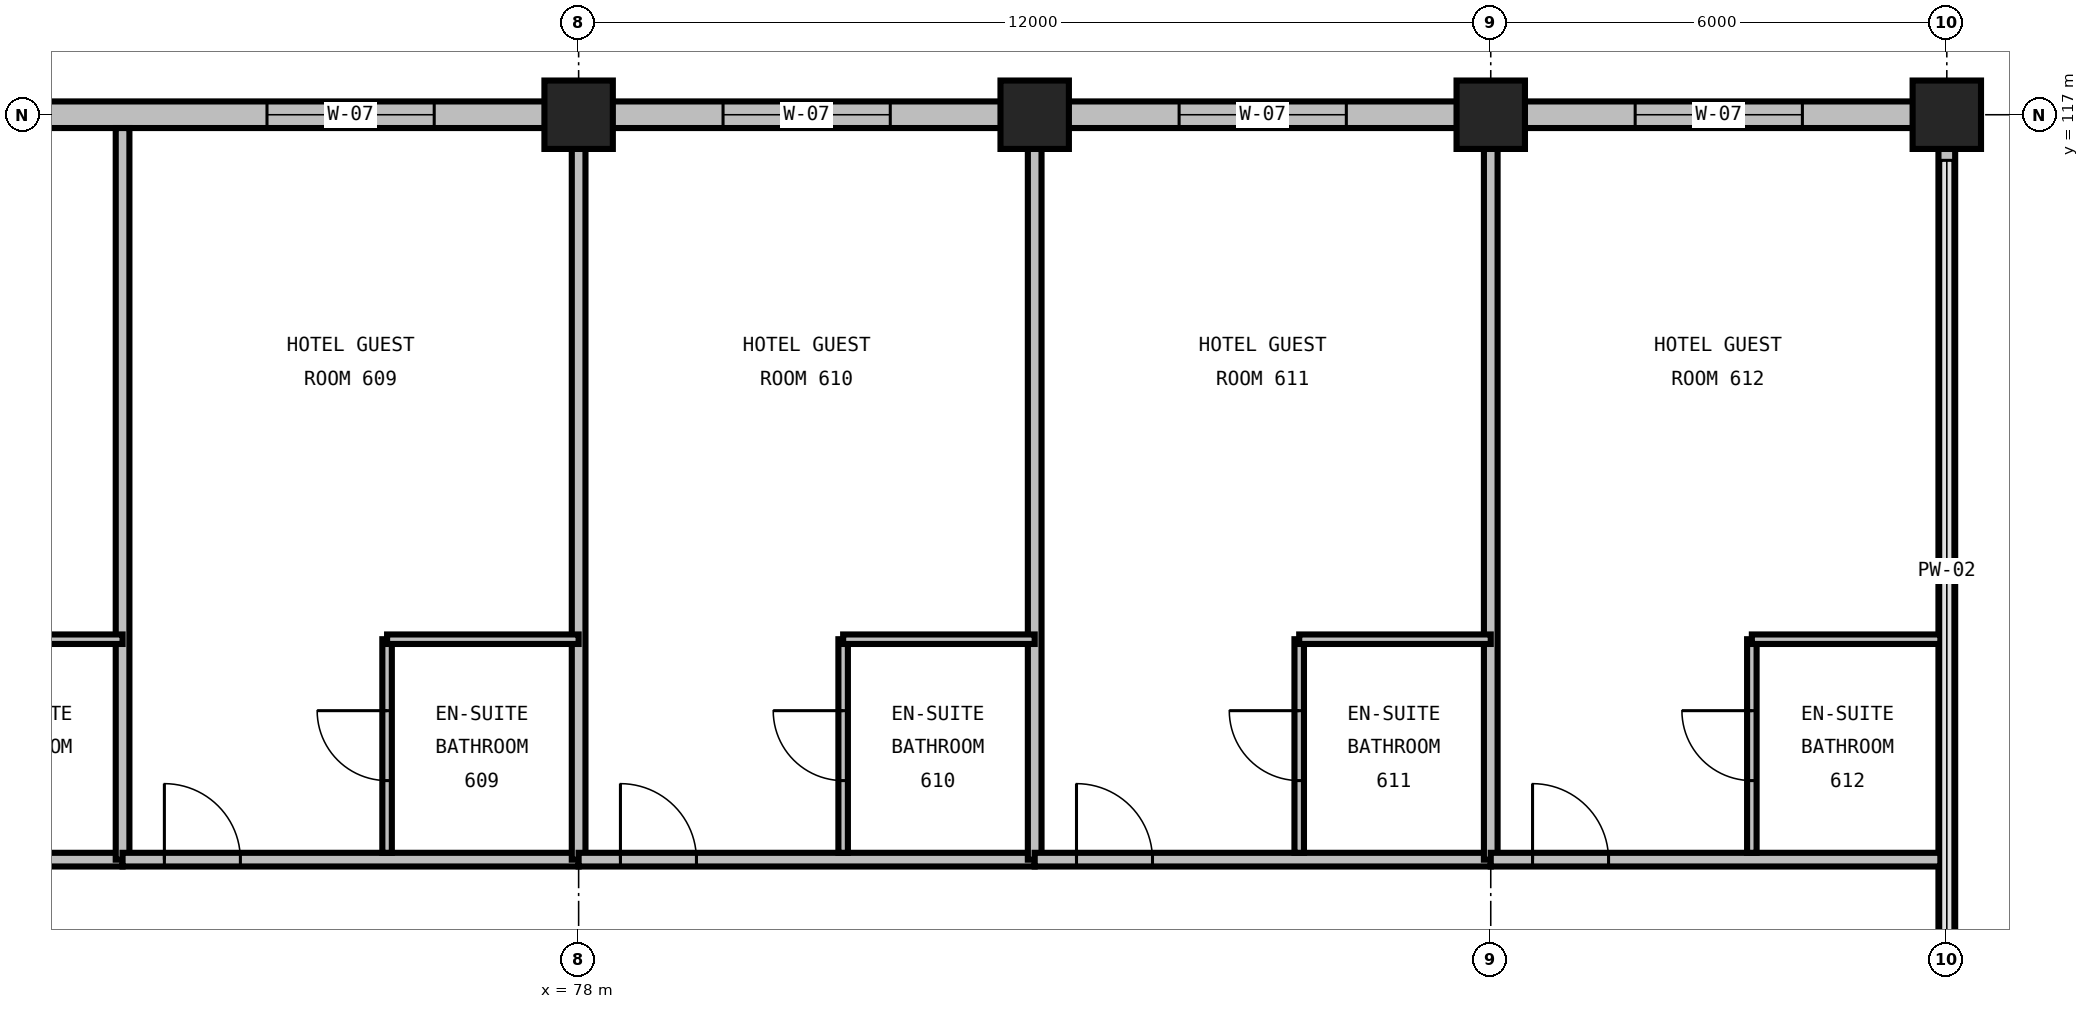
"""IFC4 building model, lengths in metres.
Left out: names, types, materials, properties, quantities, classifications, styles, units other than length and angle.
Written with IfcOpenShell. Run it as: python <this file> out.ifc"""

import sys

from ifc_helpers import new_model, si_unit, direction, frame, frame_2d, origin, origin_2d, place, context, subcontext, project, spatial, rectangle, extrude, element, fill, save


model = new_model("IFC4")
c1 = context("Model", 3, precision=1e-05, world=origin(), true_north=direction((0.0, 1.0)))
c2 = subcontext(c1, "Body", "Model", "MODEL_VIEW")
j1 = project(units=[si_unit("LENGTHUNIT", "METRE"), si_unit("PLANEANGLEUNIT", "RADIAN")], contexts=[c1])
p1 = place(None, origin())
s1 = spatial("IfcSite", under=j1, at=p1, CompositionType="ELEMENT")
p2 = place(p1, origin())
s2 = spatial("IfcBuilding", under=s1, at=p2, CompositionType="ELEMENT")
p3 = place(p2, frame((0.0, 0.0, 31.2)))
s3 = spatial("IfcBuildingStorey", under=s2, at=p3, CompositionType="ELEMENT", Elevation=31.2)
for number, where, z_axis, x_axis in (
    (1, (78.0, 117.0, 0.0), (0.0, 0.0, 1.0), (1.0, 0.0, 0.0)),
    (2, (84.0, 117.0, 0.0), (0.0, 0.0, 1.0), (1.0, 0.0, 0.0)),
    (3, (90.0, 117.0, 0.0), (0.0, 0.0, 1.0), (1.0, 0.0, 0.0)),
    (4, (96.0, 117.0, 0.0), (0.0, 0.0, 1.0), (1.0, 0.0, 0.0)),
):
    element("IfcColumn", number, at=place(p3, frame(where, z_axis=z_axis, x_axis=x_axis)), inside=s3, PredefinedType="COLUMN", context=c2, shape_type="SweptSolid", body=[
        extrude(rectangle(XDim=0.9, YDim=0.9, at=origin_2d()), origin(), (0.0, 0.0, 1.0), 3.6),
    ])
p4 = place(p3, frame((78.0, 117.0, 0.0), z_axis=(0.0, 0.0, 1.0), x_axis=(-1.0, 0.0, 0.0)))
e5 = element("IfcWall", 5, at=p4, inside=s3, PredefinedType="STANDARD", context=c2, shape_type="SweptSolid", body=[
    extrude(rectangle(XDim=12.0, YDim=0.35, at=frame_2d((6.0, 0.0))), origin(), (0.0, 0.0, 1.0), 2.486),
])
p5 = place(p4, frame((1.9, 0.0, 0.75)))
e6 = element("IfcOpeningElement", 6, at=p5, cuts=e5, PredefinedType="OPENING", context=c2, shape_type="SweptSolid", body=[
    extrude(rectangle(XDim=2.2, YDim=1.6, at=frame_2d((1.1, 0.8))), frame((0.0, 0.19, 0.0), z_axis=(0.0, -1.0, 0.0), x_axis=(1.0, 0.0, 0.0)), (0.0, 0.0, 1.0), 0.38),
])
p6 = place(p4, frame((7.825, 0.0, 0.75)))
e7 = element("IfcOpeningElement", 7, at=p6, cuts=e5, PredefinedType="OPENING", context=c2, shape_type="SweptSolid", body=[
    extrude(rectangle(XDim=2.35, YDim=1.6, at=frame_2d((1.175, 0.8))), frame((0.0, 0.19, 0.0), z_axis=(0.0, -1.0, 0.0), x_axis=(1.0, 0.0, 0.0)), (0.0, 0.0, 1.0), 0.38),
])
p7 = place(p3, frame((84.0, 117.0, 0.0), z_axis=(0.0, 0.0, 1.0), x_axis=(-1.0, 0.0, 0.0)))
e8 = element("IfcWall", 8, at=p7, inside=s3, PredefinedType="STANDARD", context=c2, shape_type="SweptSolid", body=[
    extrude(rectangle(XDim=6.0, YDim=0.35, at=frame_2d((3.0, 0.0))), origin(), (0.0, 0.0, 1.0), 2.486),
])
p8 = place(p7, frame((1.9, 0.0, 0.75)))
e9 = element("IfcOpeningElement", 9, at=p8, cuts=e8, PredefinedType="OPENING", context=c2, shape_type="SweptSolid", body=[
    extrude(rectangle(XDim=2.2, YDim=1.6, at=frame_2d((1.1, 0.8))), frame((0.0, 0.19, 0.0), z_axis=(0.0, -1.0, 0.0), x_axis=(1.0, 0.0, 0.0)), (0.0, 0.0, 1.0), 0.38),
])
p9 = place(p3, frame((90.0, 117.0, 0.0), z_axis=(0.0, 0.0, 1.0), x_axis=(-1.0, 0.0, 0.0)))
e10 = element("IfcWall", 10, at=p9, inside=s3, PredefinedType="STANDARD", context=c2, shape_type="SweptSolid", body=[
    extrude(rectangle(XDim=6.0, YDim=0.35, at=frame_2d((3.0, 0.0))), origin(), (0.0, 0.0, 1.0), 2.486),
])
p10 = place(p9, frame((1.9, 0.0, 0.75)))
e11 = element("IfcOpeningElement", 11, at=p10, cuts=e10, PredefinedType="OPENING", context=c2, shape_type="SweptSolid", body=[
    extrude(rectangle(XDim=2.2, YDim=1.6, at=frame_2d((1.1, 0.8))), frame((0.0, 0.19, 0.0), z_axis=(0.0, -1.0, 0.0), x_axis=(1.0, 0.0, 0.0)), (0.0, 0.0, 1.0), 0.38),
])
p11 = place(p3, frame((96.0, 117.0, 0.0), z_axis=(0.0, 0.0, 1.0), x_axis=(-1.0, 0.0, 0.0)))
e12 = element("IfcWall", 12, at=p11, inside=s3, PredefinedType="STANDARD", context=c2, shape_type="SweptSolid", body=[
    extrude(rectangle(XDim=6.0, YDim=0.35, at=frame_2d((3.0, 0.0))), origin(), (0.0, 0.0, 1.0), 2.486),
])
p12 = place(p11, frame((1.9, 0.0, 0.75)))
e13 = element("IfcOpeningElement", 13, at=p12, cuts=e12, PredefinedType="OPENING", context=c2, shape_type="SweptSolid", body=[
    extrude(rectangle(XDim=2.2, YDim=1.6, at=frame_2d((1.1, 0.8))), frame((0.0, 0.19, 0.0), z_axis=(0.0, -1.0, 0.0), x_axis=(1.0, 0.0, 0.0)), (0.0, 0.0, 1.0), 0.38),
])
p13 = place(p3, frame((96.0, 105.0, 0.0), z_axis=(0.0, 0.0, 1.0), x_axis=(0.0, 1.0, 0.0)))
e14 = element("IfcWall", 14, at=p13, inside=s3, PredefinedType="PARAPET", context=c2, shape_type="SweptSolid", body=[
    extrude(rectangle(XDim=12.0, YDim=0.22, at=frame_2d((6.0, 0.0))), origin(), (0.0, 0.0, 1.0), 0.2),
])
p14 = place(p3, frame((66.0, 107.2, 0.0), z_axis=(0.0, 0.0, 1.0), x_axis=(1.0, 0.0, 0.0)))
e15 = element("IfcWall", 15, at=p14, inside=s3, PredefinedType="PARTITIONING", context=c2, shape_type="SweptSolid", body=[
    extrude(rectangle(XDim=6.0, YDim=0.18, at=frame_2d((3.0, 0.0))), origin(), (0.0, 0.0, 1.0), 3.29),
])
p15 = place(p14, frame((0.55, 0.0, 0.0)))
e16 = element("IfcOpeningElement", 16, at=p15, cuts=e15, PredefinedType="OPENING", context=c2, shape_type="SweptSolid", body=[
    extrude(rectangle(XDim=1.0, YDim=2.15, at=frame_2d((0.5, 1.075))), frame((0.0, 0.105, 0.0), z_axis=(0.0, -1.0, 0.0), x_axis=(1.0, 0.0, 0.0)), (0.0, 0.0, 1.0), 0.21),
])
p16 = place(p3, frame((72.0, 107.2, 0.0), z_axis=(0.0, 0.0, 1.0), x_axis=(0.0, 1.0, 0.0)))
e17 = element("IfcWall", 17, at=p16, inside=s3, PredefinedType="PARTITIONING", context=c2, shape_type="SweptSolid", body=[
    extrude(rectangle(XDim=9.625, YDim=0.18, at=frame_2d((4.812, 0.0))), origin(), (0.0, 0.0, 1.0), 3.29),
])
p17 = place(p3, frame((69.48, 110.1, 0.0), z_axis=(0.0, 0.0, 1.0), x_axis=(1.0, 0.0, 0.0)))
e18 = element("IfcWall", 18, at=p17, inside=s3, PredefinedType="PARTITIONING", context=c2, shape_type="SweptSolid", body=[
    extrude(rectangle(XDim=2.52, YDim=0.125, at=frame_2d((1.26, 0.0))), origin(), (0.0, 0.0, 1.0), 3.29),
])
p18 = place(p3, frame((72.0, 107.2, 0.0), z_axis=(0.0, 0.0, 1.0), x_axis=(1.0, 0.0, 0.0)))
e19 = element("IfcWall", 19, at=p18, inside=s3, PredefinedType="PARTITIONING", context=c2, shape_type="SweptSolid", body=[
    extrude(rectangle(XDim=6.0, YDim=0.18, at=frame_2d((3.0, 0.0))), origin(), (0.0, 0.0, 1.0), 3.29),
])
p19 = place(p18, frame((0.55, 0.0, 0.0)))
e20 = element("IfcOpeningElement", 20, at=p19, cuts=e19, PredefinedType="OPENING", context=c2, shape_type="SweptSolid", body=[
    extrude(rectangle(XDim=1.0, YDim=2.15, at=frame_2d((0.5, 1.075))), frame((0.0, 0.105, 0.0), z_axis=(0.0, -1.0, 0.0), x_axis=(1.0, 0.0, 0.0)), (0.0, 0.0, 1.0), 0.21),
])
p20 = place(p3, frame((78.0, 107.2, 0.0), z_axis=(0.0, 0.0, 1.0), x_axis=(0.0, 1.0, 0.0)))
e21 = element("IfcWall", 21, at=p20, inside=s3, PredefinedType="PARTITIONING", context=c2, shape_type="SweptSolid", body=[
    extrude(rectangle(XDim=9.625, YDim=0.18, at=frame_2d((4.812, 0.0))), origin(), (0.0, 0.0, 1.0), 2.59),
])
p21 = place(p3, frame((75.48, 107.29, 0.0), z_axis=(0.0, 0.0, 1.0), x_axis=(0.0, 1.0, 0.0)))
e22 = element("IfcWall", 22, at=p21, inside=s3, PredefinedType="PARTITIONING", context=c2, shape_type="SweptSolid", body=[
    extrude(rectangle(XDim=2.81, YDim=0.125, at=frame_2d((1.405, 0.0))), origin(), (0.0, 0.0, 1.0), 3.29),
])
p22 = place(p21, frame((0.95, 0.0, 0.0)))
e23 = element("IfcOpeningElement", 23, at=p22, cuts=e22, PredefinedType="OPENING", context=c2, shape_type="SweptSolid", body=[
    extrude(rectangle(XDim=0.92, YDim=2.1, at=frame_2d((0.46, 1.05))), frame((0.0, 0.077, 0.0), z_axis=(0.0, -1.0, 0.0), x_axis=(1.0, 0.0, 0.0)), (0.0, 0.0, 1.0), 0.155),
])
p23 = place(p3, frame((75.48, 110.1, 0.0), z_axis=(0.0, 0.0, 1.0), x_axis=(1.0, 0.0, 0.0)))
e24 = element("IfcWall", 24, at=p23, inside=s3, PredefinedType="PARTITIONING", context=c2, shape_type="SweptSolid", body=[
    extrude(rectangle(XDim=2.52, YDim=0.125, at=frame_2d((1.26, 0.0))), origin(), (0.0, 0.0, 1.0), 3.29),
])
p24 = place(p3, frame((78.0, 107.2, 0.0), z_axis=(0.0, 0.0, 1.0), x_axis=(1.0, 0.0, 0.0)))
e25 = element("IfcWall", 25, at=p24, inside=s3, PredefinedType="PARTITIONING", context=c2, shape_type="SweptSolid", body=[
    extrude(rectangle(XDim=6.0, YDim=0.18, at=frame_2d((3.0, 0.0))), origin(), (0.0, 0.0, 1.0), 3.29),
])
p25 = place(p24, frame((0.55, 0.0, 0.0)))
e26 = element("IfcOpeningElement", 26, at=p25, cuts=e25, PredefinedType="OPENING", context=c2, shape_type="SweptSolid", body=[
    extrude(rectangle(XDim=1.0, YDim=2.15, at=frame_2d((0.5, 1.075))), frame((0.0, 0.105, 0.0), z_axis=(0.0, -1.0, 0.0), x_axis=(1.0, 0.0, 0.0)), (0.0, 0.0, 1.0), 0.21),
])
p26 = place(p3, frame((84.0, 107.2, 0.0), z_axis=(0.0, 0.0, 1.0), x_axis=(0.0, 1.0, 0.0)))
e27 = element("IfcWall", 27, at=p26, inside=s3, PredefinedType="PARTITIONING", context=c2, shape_type="SweptSolid", body=[
    extrude(rectangle(XDim=9.625, YDim=0.18, at=frame_2d((4.812, 0.0))), origin(), (0.0, 0.0, 1.0), 2.59),
])
p27 = place(p3, frame((81.48, 107.29, 0.0), z_axis=(0.0, 0.0, 1.0), x_axis=(0.0, 1.0, 0.0)))
e28 = element("IfcWall", 28, at=p27, inside=s3, PredefinedType="PARTITIONING", context=c2, shape_type="SweptSolid", body=[
    extrude(rectangle(XDim=2.81, YDim=0.125, at=frame_2d((1.405, 0.0))), origin(), (0.0, 0.0, 1.0), 3.29),
])
p28 = place(p27, frame((0.95, 0.0, 0.0)))
e29 = element("IfcOpeningElement", 29, at=p28, cuts=e28, PredefinedType="OPENING", context=c2, shape_type="SweptSolid", body=[
    extrude(rectangle(XDim=0.92, YDim=2.1, at=frame_2d((0.46, 1.05))), frame((0.0, 0.077, 0.0), z_axis=(0.0, -1.0, 0.0), x_axis=(1.0, 0.0, 0.0)), (0.0, 0.0, 1.0), 0.155),
])
p29 = place(p3, frame((81.48, 110.1, 0.0), z_axis=(0.0, 0.0, 1.0), x_axis=(1.0, 0.0, 0.0)))
e30 = element("IfcWall", 30, at=p29, inside=s3, PredefinedType="PARTITIONING", context=c2, shape_type="SweptSolid", body=[
    extrude(rectangle(XDim=2.52, YDim=0.125, at=frame_2d((1.26, 0.0))), origin(), (0.0, 0.0, 1.0), 3.29),
])
p30 = place(p3, frame((84.0, 107.2, 0.0), z_axis=(0.0, 0.0, 1.0), x_axis=(1.0, 0.0, 0.0)))
e31 = element("IfcWall", 31, at=p30, inside=s3, PredefinedType="PARTITIONING", context=c2, shape_type="SweptSolid", body=[
    extrude(rectangle(XDim=6.0, YDim=0.18, at=frame_2d((3.0, 0.0))), origin(), (0.0, 0.0, 1.0), 3.29),
])
p31 = place(p30, frame((0.55, 0.0, 0.0)))
e32 = element("IfcOpeningElement", 32, at=p31, cuts=e31, PredefinedType="OPENING", context=c2, shape_type="SweptSolid", body=[
    extrude(rectangle(XDim=1.0, YDim=2.15, at=frame_2d((0.5, 1.075))), frame((0.0, 0.105, 0.0), z_axis=(0.0, -1.0, 0.0), x_axis=(1.0, 0.0, 0.0)), (0.0, 0.0, 1.0), 0.21),
])
p32 = place(p3, frame((90.0, 107.2, 0.0), z_axis=(0.0, 0.0, 1.0), x_axis=(0.0, 1.0, 0.0)))
e33 = element("IfcWall", 33, at=p32, inside=s3, PredefinedType="PARTITIONING", context=c2, shape_type="SweptSolid", body=[
    extrude(rectangle(XDim=9.625, YDim=0.18, at=frame_2d((4.812, 0.0))), origin(), (0.0, 0.0, 1.0), 2.59),
])
p33 = place(p3, frame((87.48, 107.29, 0.0), z_axis=(0.0, 0.0, 1.0), x_axis=(0.0, 1.0, 0.0)))
e34 = element("IfcWall", 34, at=p33, inside=s3, PredefinedType="PARTITIONING", context=c2, shape_type="SweptSolid", body=[
    extrude(rectangle(XDim=2.81, YDim=0.125, at=frame_2d((1.405, 0.0))), origin(), (0.0, 0.0, 1.0), 3.29),
])
p34 = place(p33, frame((0.95, 0.0, 0.0)))
e35 = element("IfcOpeningElement", 35, at=p34, cuts=e34, PredefinedType="OPENING", context=c2, shape_type="SweptSolid", body=[
    extrude(rectangle(XDim=0.92, YDim=2.1, at=frame_2d((0.46, 1.05))), frame((0.0, 0.077, 0.0), z_axis=(0.0, -1.0, 0.0), x_axis=(1.0, 0.0, 0.0)), (0.0, 0.0, 1.0), 0.155),
])
p35 = place(p3, frame((87.48, 110.1, 0.0), z_axis=(0.0, 0.0, 1.0), x_axis=(1.0, 0.0, 0.0)))
e36 = element("IfcWall", 36, at=p35, inside=s3, PredefinedType="PARTITIONING", context=c2, shape_type="SweptSolid", body=[
    extrude(rectangle(XDim=2.52, YDim=0.125, at=frame_2d((1.26, 0.0))), origin(), (0.0, 0.0, 1.0), 3.29),
])
p36 = place(p3, frame((90.0, 107.2, 0.0), z_axis=(0.0, 0.0, 1.0), x_axis=(1.0, 0.0, 0.0)))
e37 = element("IfcWall", 37, at=p36, inside=s3, PredefinedType="PARTITIONING", context=c2, shape_type="SweptSolid", body=[
    extrude(rectangle(XDim=5.915, YDim=0.18, at=frame_2d((2.957, 0.0))), origin(), (0.0, 0.0, 1.0), 3.29),
])
p37 = place(p36, frame((0.55, 0.0, 0.0)))
e38 = element("IfcOpeningElement", 38, at=p37, cuts=e37, PredefinedType="OPENING", context=c2, shape_type="SweptSolid", body=[
    extrude(rectangle(XDim=1.0, YDim=2.15, at=frame_2d((0.5, 1.075))), frame((0.0, 0.105, 0.0), z_axis=(0.0, -1.0, 0.0), x_axis=(1.0, 0.0, 0.0)), (0.0, 0.0, 1.0), 0.21),
])
p38 = place(p3, frame((93.435, 107.29, 0.0), z_axis=(0.0, 0.0, 1.0), x_axis=(0.0, 1.0, 0.0)))
e39 = element("IfcWall", 39, at=p38, inside=s3, PredefinedType="PARTITIONING", context=c2, shape_type="SweptSolid", body=[
    extrude(rectangle(XDim=2.81, YDim=0.125, at=frame_2d((1.405, 0.0))), origin(), (0.0, 0.0, 1.0), 3.29),
])
p39 = place(p38, frame((0.95, 0.0, 0.0)))
e40 = element("IfcOpeningElement", 40, at=p39, cuts=e39, PredefinedType="OPENING", context=c2, shape_type="SweptSolid", body=[
    extrude(rectangle(XDim=0.92, YDim=2.1, at=frame_2d((0.46, 1.05))), frame((0.0, 0.077, 0.0), z_axis=(0.0, -1.0, 0.0), x_axis=(1.0, 0.0, 0.0)), (0.0, 0.0, 1.0), 0.155),
])
p40 = place(p3, frame((93.435, 110.1, 0.0), z_axis=(0.0, 0.0, 1.0), x_axis=(1.0, 0.0, 0.0)))
e41 = element("IfcWall", 41, at=p40, inside=s3, PredefinedType="PARTITIONING", context=c2, shape_type="SweptSolid", body=[
    extrude(rectangle(XDim=2.48, YDim=0.125, at=frame_2d((1.24, 0.0))), origin(), (0.0, 0.0, 1.0), 3.29),
])
p41 = place(p5, origin())
e42 = element("IfcWindow", 42, at=p41, inside=s3, PartitioningType="DOUBLE_PANEL_VERTICAL", PredefinedType="WINDOW", context=c2, shape_type="SweptSolid", body=[
    extrude(rectangle(XDim=2.2, YDim=1.6, at=frame_2d((1.1, 0.8))), frame((0.0, 0.03, 0.0), z_axis=(0.0, -1.0, 0.0), x_axis=(1.0, 0.0, 0.0)), (0.0, 0.0, 1.0), 0.06),
])
fill(e6, e42)
p42 = place(p8, origin())
e43 = element("IfcWindow", 43, at=p42, inside=s3, PartitioningType="DOUBLE_PANEL_VERTICAL", PredefinedType="WINDOW", context=c2, shape_type="SweptSolid", body=[
    extrude(rectangle(XDim=2.2, YDim=1.6, at=frame_2d((1.1, 0.8))), frame((0.0, 0.03, 0.0), z_axis=(0.0, -1.0, 0.0), x_axis=(1.0, 0.0, 0.0)), (0.0, 0.0, 1.0), 0.06),
])
fill(e9, e43)
p43 = place(p10, origin())
e44 = element("IfcWindow", 44, at=p43, inside=s3, PartitioningType="DOUBLE_PANEL_VERTICAL", PredefinedType="WINDOW", context=c2, shape_type="SweptSolid", body=[
    extrude(rectangle(XDim=2.2, YDim=1.6, at=frame_2d((1.1, 0.8))), frame((0.0, 0.03, 0.0), z_axis=(0.0, -1.0, 0.0), x_axis=(1.0, 0.0, 0.0)), (0.0, 0.0, 1.0), 0.06),
])
fill(e11, e44)
p44 = place(p12, origin())
e45 = element("IfcWindow", 45, at=p44, inside=s3, PartitioningType="DOUBLE_PANEL_VERTICAL", PredefinedType="WINDOW", context=c2, shape_type="SweptSolid", body=[
    extrude(rectangle(XDim=2.2, YDim=1.6, at=frame_2d((1.1, 0.8))), frame((0.0, 0.03, 0.0), z_axis=(0.0, -1.0, 0.0), x_axis=(1.0, 0.0, 0.0)), (0.0, 0.0, 1.0), 0.06),
])
fill(e13, e45)
p45 = place(p19, origin())
e46 = element("IfcDoor", 46, at=p45, inside=s3, OperationType="SINGLE_SWING_LEFT", PredefinedType="DOOR", context=c2, shape_type="SweptSolid", body=[
    extrude(rectangle(XDim=1.0, YDim=2.15, at=frame_2d((0.5, 1.075))), frame((0.0, 0.025, 0.0), z_axis=(0.0, -1.0, 0.0), x_axis=(1.0, 0.0, 0.0)), (0.0, 0.0, 1.0), 0.05),
])
fill(e20, e46)
p46 = place(p22, origin())
e47 = element("IfcDoor", 47, at=p46, inside=s3, OperationType="SINGLE_SWING_RIGHT", PredefinedType="DOOR", context=c2, shape_type="SweptSolid", body=[
    extrude(rectangle(XDim=0.92, YDim=2.1, at=frame_2d((0.46, 1.05))), frame((0.0, 0.025, 0.0), z_axis=(0.0, -1.0, 0.0), x_axis=(1.0, 0.0, 0.0)), (0.0, 0.0, 1.0), 0.05),
])
fill(e23, e47)
p47 = place(p25, origin())
e48 = element("IfcDoor", 48, at=p47, inside=s3, OperationType="SINGLE_SWING_LEFT", PredefinedType="DOOR", context=c2, shape_type="SweptSolid", body=[
    extrude(rectangle(XDim=1.0, YDim=2.15, at=frame_2d((0.5, 1.075))), frame((0.0, 0.025, 0.0), z_axis=(0.0, -1.0, 0.0), x_axis=(1.0, 0.0, 0.0)), (0.0, 0.0, 1.0), 0.05),
])
fill(e26, e48)
p48 = place(p28, origin())
e49 = element("IfcDoor", 49, at=p48, inside=s3, OperationType="SINGLE_SWING_RIGHT", PredefinedType="DOOR", context=c2, shape_type="SweptSolid", body=[
    extrude(rectangle(XDim=0.92, YDim=2.1, at=frame_2d((0.46, 1.05))), frame((0.0, 0.025, 0.0), z_axis=(0.0, -1.0, 0.0), x_axis=(1.0, 0.0, 0.0)), (0.0, 0.0, 1.0), 0.05),
])
fill(e29, e49)
p49 = place(p31, origin())
e50 = element("IfcDoor", 50, at=p49, inside=s3, OperationType="SINGLE_SWING_LEFT", PredefinedType="DOOR", context=c2, shape_type="SweptSolid", body=[
    extrude(rectangle(XDim=1.0, YDim=2.15, at=frame_2d((0.5, 1.075))), frame((0.0, 0.025, 0.0), z_axis=(0.0, -1.0, 0.0), x_axis=(1.0, 0.0, 0.0)), (0.0, 0.0, 1.0), 0.05),
])
fill(e32, e50)
p50 = place(p34, origin())
e51 = element("IfcDoor", 51, at=p50, inside=s3, OperationType="SINGLE_SWING_RIGHT", PredefinedType="DOOR", context=c2, shape_type="SweptSolid", body=[
    extrude(rectangle(XDim=0.92, YDim=2.1, at=frame_2d((0.46, 1.05))), frame((0.0, 0.025, 0.0), z_axis=(0.0, -1.0, 0.0), x_axis=(1.0, 0.0, 0.0)), (0.0, 0.0, 1.0), 0.05),
])
fill(e35, e51)
p51 = place(p37, origin())
e52 = element("IfcDoor", 52, at=p51, inside=s3, OperationType="SINGLE_SWING_LEFT", PredefinedType="DOOR", context=c2, shape_type="SweptSolid", body=[
    extrude(rectangle(XDim=1.0, YDim=2.15, at=frame_2d((0.5, 1.075))), frame((0.0, 0.025, 0.0), z_axis=(0.0, -1.0, 0.0), x_axis=(1.0, 0.0, 0.0)), (0.0, 0.0, 1.0), 0.05),
])
fill(e38, e52)
p52 = place(p39, origin())
e53 = element("IfcDoor", 53, at=p52, inside=s3, OperationType="SINGLE_SWING_RIGHT", PredefinedType="DOOR", context=c2, shape_type="SweptSolid", body=[
    extrude(rectangle(XDim=0.92, YDim=2.1, at=frame_2d((0.46, 1.05))), frame((0.0, 0.025, 0.0), z_axis=(0.0, -1.0, 0.0), x_axis=(1.0, 0.0, 0.0)), (0.0, 0.0, 1.0), 0.05),
])
fill(e40, e53)
save(model, sys.argv[1])
